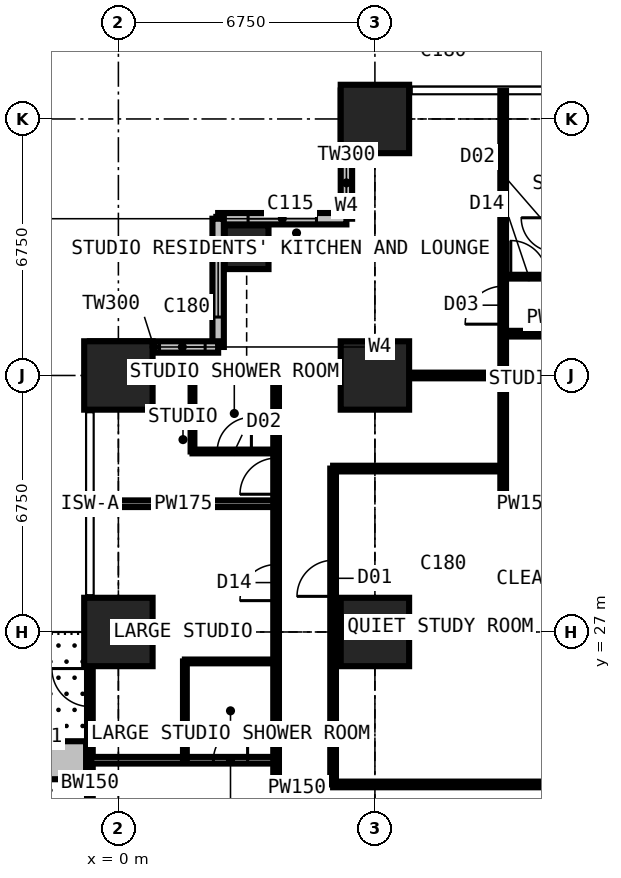
"""IFC4 building model, lengths in metres.
Left out: names, types, materials, properties, quantities, classifications, styles, units other than length and angle.
Written with IfcOpenShell. Run it as: python <this file> out.ifc"""

import sys

from ifc_helpers import new_model, si_unit, direction, frame, frame_2d, origin, origin_2d, place, context, subcontext, project, spatial, rectangle, extrude, element, fill, save


model = new_model("IFC4")
c1 = context("Model", 3, precision=1e-05, world=origin(), true_north=direction((0.0, 1.0)))
c2 = subcontext(c1, "Body", "Model", "MODEL_VIEW")
j1 = project(units=[si_unit("LENGTHUNIT", "METRE"), si_unit("PLANEANGLEUNIT", "RADIAN")], contexts=[c1])
p1 = place(None, origin())
s1 = spatial("IfcSite", under=j1, at=p1, CompositionType="ELEMENT")
p2 = place(p1, origin())
s2 = spatial("IfcBuilding", under=s1, at=p2, CompositionType="ELEMENT")
p3 = place(p2, frame((0.0, 0.0, 50.4)))
s3 = spatial("IfcBuildingStorey", under=s2, at=p3, CompositionType="ELEMENT", Elevation=50.4)
for number, where, z_axis, x_axis in (
    (1, (0.0, 27.0, 0.0), (0.0, 0.0, 1.0), (1.0, 0.0, 0.0)),
    (2, (0.0, 33.75, 0.0), (0.0, 0.0, 1.0), (1.0, 0.0, 0.0)),
):
    element("IfcColumn", number, at=place(p3, frame(where, z_axis=z_axis, x_axis=x_axis)), inside=s3, PredefinedType="COLUMN", context=c2, shape_type="SweptSolid", body=[
        extrude(rectangle(XDim=1.8, YDim=1.8, at=origin_2d()), origin(), (0.0, 0.0, 1.0), 3.6),
    ])
p4 = place(p3, frame((3.375, 37.125, 0.0), z_axis=(0.0, 0.0, 1.0), x_axis=(1.0, 0.0, 0.0)))
e3 = element("IfcColumn", 3, at=p4, inside=s3, PredefinedType="COLUMN", context=c2, shape_type="SweptSolid", body=[
    extrude(rectangle(XDim=1.15, YDim=1.15, at=origin_2d()), origin(), (0.0, 0.0, 1.0), 3.6),
])
for number, where, z_axis, x_axis in (
    (4, (6.75, 27.0, 0.0), (0.0, 0.0, 1.0), (1.0, 0.0, 0.0)),
    (5, (6.75, 33.75, 0.0), (0.0, 0.0, 1.0), (1.0, 0.0, 0.0)),
    (6, (6.75, 40.5, 0.0), (0.0, 0.0, 1.0), (1.0, 0.0, 0.0)),
):
    element("IfcColumn", number, at=place(p3, frame(where, z_axis=z_axis, x_axis=x_axis)), inside=s3, PredefinedType="COLUMN", context=c2, shape_type="SweptSolid", body=[
        extrude(rectangle(XDim=1.8, YDim=1.8, at=origin_2d()), origin(), (0.0, 0.0, 1.0), 3.6),
    ])
p5 = place(p3, frame((6.0, 41.25, 0.0), z_axis=(0.0, 0.0, 1.0), x_axis=(0.0, -1.0, 0.0)))
e7 = element("IfcWall", 7, at=p5, inside=s3, PredefinedType="SOLIDWALL", context=c2, shape_type="SweptSolid", body=[
    extrude(rectangle(XDim=3.375, YDim=0.3, at=frame_2d((1.688, 0.0))), origin(), (0.0, 0.0, 1.0), 3.375),
])
p6 = place(p5, frame((1.833, 0.0, 0.9)))
e8 = element("IfcOpeningElement", 8, at=p6, cuts=e7, PredefinedType="OPENING", context=c2, shape_type="SweptSolid", body=[
    extrude(rectangle(XDim=1.2, YDim=1.8, at=frame_2d((0.6, 0.9))), frame((0.0, 0.16, 0.0), z_axis=(0.0, -1.0, 0.0), x_axis=(1.0, 0.0, 0.0)), (0.0, 0.0, 1.0), 0.32),
])
p7 = place(p3, frame((6.0, 37.875, 0.0), z_axis=(0.0, 0.0, 1.0), x_axis=(-1.0, 0.0, 0.0)))
e9 = element("IfcWall", 9, at=p7, inside=s3, PredefinedType="SOLIDWALL", context=c2, shape_type="SweptSolid", body=[
    extrude(rectangle(XDim=3.375, YDim=0.3, at=frame_2d((1.688, 0.0))), origin(), (0.0, 0.0, 1.0), 3.375),
])
p8 = place(p7, frame((0.788, 0.0, 0.6)))
e10 = element("IfcOpeningElement", 10, at=p8, cuts=e9, PredefinedType="OPENING", context=c2, shape_type="SweptSolid", body=[
    extrude(rectangle(XDim=1.8, YDim=2.1, at=frame_2d((0.9, 1.05))), frame((0.0, 0.16, 0.0), z_axis=(0.0, -1.0, 0.0), x_axis=(1.0, 0.0, 0.0)), (0.0, 0.0, 1.0), 0.32),
])
p9 = place(p3, frame((2.625, 37.875, 0.0), z_axis=(0.0, 0.0, 1.0), x_axis=(0.0, -1.0, 0.0)))
e11 = element("IfcWall", 11, at=p9, inside=s3, PredefinedType="SOLIDWALL", context=c2, shape_type="SweptSolid", body=[
    extrude(rectangle(XDim=3.375, YDim=0.3, at=frame_2d((1.688, 0.0))), origin(), (0.0, 0.0, 1.0), 3.375),
])
p10 = place(p9, frame((0.788, 0.0, 0.6)))
e12 = element("IfcOpeningElement", 12, at=p10, cuts=e11, PredefinedType="OPENING", context=c2, shape_type="SweptSolid", body=[
    extrude(rectangle(XDim=1.8, YDim=2.1, at=frame_2d((0.9, 1.05))), frame((0.0, 0.16, 0.0), z_axis=(0.0, -1.0, 0.0), x_axis=(1.0, 0.0, 0.0)), (0.0, 0.0, 1.0), 0.32),
])
p11 = place(p3, frame((2.625, 34.5, 0.0), z_axis=(0.0, 0.0, 1.0), x_axis=(-1.0, 0.0, 0.0)))
e13 = element("IfcWall", 13, at=p11, inside=s3, PredefinedType="SOLIDWALL", context=c2, shape_type="SweptSolid", body=[
    extrude(rectangle(XDim=3.375, YDim=0.3, at=frame_2d((1.688, 0.0))), origin(), (0.0, 0.0, 1.0), 3.375),
])
p12 = place(p11, frame((0.343, 0.0, 0.9)))
e14 = element("IfcOpeningElement", 14, at=p12, cuts=e13, PredefinedType="OPENING", context=c2, shape_type="SweptSolid", body=[
    extrude(rectangle(XDim=1.2, YDim=1.8, at=frame_2d((0.6, 0.9))), frame((0.0, 0.16, 0.0), z_axis=(0.0, -1.0, 0.0), x_axis=(1.0, 0.0, 0.0)), (0.0, 0.0, 1.0), 0.32),
])
p13 = place(p3, frame((-0.75, 20.25, 0.0), z_axis=(0.0, 0.0, 1.0), x_axis=(0.0, 1.0, 0.0)))
e15 = element("IfcWall", 15, at=p13, inside=s3, PredefinedType="SOLIDWALL", context=c2, shape_type="SweptSolid", body=[
    extrude(rectangle(XDim=6.75, YDim=0.15, at=frame_2d((3.375, 0.0))), origin(), (0.0, 0.0, 1.0), 3.375),
])
p14 = place(p13, frame((0.962, 0.0, 0.0)))
e16 = element("IfcOpeningElement", 16, at=p14, cuts=e15, PredefinedType="OPENING", context=c2, shape_type="SweptSolid", body=[
    extrude(rectangle(XDim=1.0, YDim=2.2, at=frame_2d((0.5, 1.1))), frame((0.0, 0.085, 0.0), z_axis=(0.0, -1.0, 0.0), x_axis=(1.0, 0.0, 0.0)), (0.0, 0.0, 1.0), 0.17),
])
p15 = place(p13, frame((2.025, 0.0, 0.9)))
e17 = element("IfcOpeningElement", 17, at=p15, cuts=e15, PredefinedType="OPENING", context=c2, shape_type="SweptSolid", body=[
    extrude(rectangle(XDim=1.2, YDim=1.8, at=frame_2d((0.6, 0.9))), frame((0.0, 0.085, 0.0), z_axis=(0.0, -1.0, 0.0), x_axis=(1.0, 0.0, 0.0)), (0.0, 0.0, 1.0), 0.17),
])
p16 = place(p13, frame((4.788, 0.0, 0.0)))
e18 = element("IfcOpeningElement", 18, at=p16, cuts=e15, PredefinedType="OPENING", context=c2, shape_type="SweptSolid", body=[
    extrude(rectangle(XDim=1.0, YDim=2.2, at=frame_2d((0.5, 1.1))), frame((0.0, 0.085, 0.0), z_axis=(0.0, -1.0, 0.0), x_axis=(1.0, 0.0, 0.0)), (0.0, 0.0, 1.0), 0.17),
])
p17 = place(p13, frame((3.525, 0.0, 0.9)))
e19 = element("IfcOpeningElement", 19, at=p17, cuts=e15, PredefinedType="OPENING", context=c2, shape_type="SweptSolid", body=[
    extrude(rectangle(XDim=1.2, YDim=1.8, at=frame_2d((0.6, 0.9))), frame((0.0, 0.085, 0.0), z_axis=(0.0, -1.0, 0.0), x_axis=(1.0, 0.0, 0.0)), (0.0, 0.0, 1.0), 0.17),
])
p18 = place(p3, frame((-0.85, 23.625, 0.0), z_axis=(0.0, 0.0, 1.0), x_axis=(-1.0, 0.0, 0.0)))
e20 = element("IfcWall", 20, at=p18, inside=s3, PredefinedType="USERDEFINED", context=c2, shape_type="SweptSolid", body=[
    extrude(rectangle(XDim=2.2, YDim=1.0, at=frame_2d((1.1, 0.0))), origin(), (0.0, 0.0, 1.0), 0.9),
])
p19 = place(p3, frame((-0.734, 23.625, 0.0), z_axis=(0.0, 0.0, 1.0), x_axis=(1.0, 0.0, 0.0)))
e21 = element("IfcWall", 21, at=p19, inside=s3, PredefinedType="PARTITIONING", context=c2, shape_type="SweptSolid", body=[
    extrude(rectangle(XDim=4.884, YDim=0.175, at=frame_2d((2.442, 0.0))), origin(), (0.0, 0.0, 1.0), 3.375),
])
p20 = place(p19, frame((3.234, 0.0, 0.0)))
e22 = element("IfcOpeningElement", 22, at=p20, cuts=e21, PredefinedType="OPENING", context=c2, shape_type="SweptSolid", body=[
    extrude(rectangle(XDim=0.9, YDim=2.2, at=frame_2d((0.45, 1.1))), frame((0.0, 0.097, 0.0), z_axis=(0.0, -1.0, 0.0), x_axis=(1.0, 0.0, 0.0)), (0.0, 0.0, 1.0), 0.195),
])
p21 = place(p3, frame((-0.734, 30.375, 0.0), z_axis=(0.0, 0.0, 1.0), x_axis=(1.0, 0.0, 0.0)))
e23 = element("IfcWall", 23, at=p21, inside=s3, PredefinedType="PARTITIONING", context=c2, shape_type="SweptSolid", body=[
    extrude(rectangle(XDim=4.884, YDim=0.175, at=frame_2d((2.442, 0.0))), origin(), (0.0, 0.0, 1.0), 3.375),
])
p22 = place(p3, frame((-0.734, 33.75, 0.0), z_axis=(0.0, 0.0, 1.0), x_axis=(1.0, 0.0, 0.0)))
e24 = element("IfcWall", 24, at=p22, inside=s3, PredefinedType="PARTITIONING", context=c2, shape_type="SweptSolid", body=[
    extrude(rectangle(XDim=10.859, YDim=0.15, at=frame_2d((5.429, 0.0))), origin(), (0.0, 0.0, 1.0), 2.877),
])
p23 = place(p3, frame((1.75, 23.625, 0.0), z_axis=(0.0, 0.0, 1.0), x_axis=(0.0, 1.0, 0.0)))
e25 = element("IfcWall", 25, at=p23, inside=s3, PredefinedType="PARTITIONING", context=c2, shape_type="SweptSolid", body=[
    extrude(rectangle(XDim=2.6, YDim=0.1, at=frame_2d((1.3, 0.0))), origin(), (0.0, 0.0, 1.0), 3.375),
])
p24 = place(p3, frame((1.75, 26.225, 0.0), z_axis=(0.0, 0.0, 1.0), x_axis=(1.0, 0.0, 0.0)))
e26 = element("IfcWall", 26, at=p24, inside=s3, PredefinedType="PARTITIONING", context=c2, shape_type="SweptSolid", body=[
    extrude(rectangle(XDim=2.4, YDim=0.1, at=frame_2d((1.2, 0.0))), origin(), (0.0, 0.0, 1.0), 3.375),
])
p25 = place(p3, frame((1.95, 31.75, 0.0), z_axis=(0.0, 0.0, 1.0), x_axis=(0.0, 1.0, 0.0)))
e27 = element("IfcWall", 27, at=p25, inside=s3, PredefinedType="PARTITIONING", context=c2, shape_type="SweptSolid", body=[
    extrude(rectangle(XDim=2.0, YDim=0.1, at=frame_2d((1.0, 0.0))), origin(), (0.0, 0.0, 1.0), 3.375),
])
p26 = place(p3, frame((1.95, 31.75, 0.0), z_axis=(0.0, 0.0, 1.0), x_axis=(1.0, 0.0, 0.0)))
e28 = element("IfcWall", 28, at=p26, inside=s3, PredefinedType="PARTITIONING", context=c2, shape_type="SweptSolid", body=[
    extrude(rectangle(XDim=2.2, YDim=0.1, at=frame_2d((1.1, 0.0))), origin(), (0.0, 0.0, 1.0), 3.375),
])
p27 = place(p26, frame((0.65, 0.0, 0.0)))
e29 = element("IfcOpeningElement", 29, at=p27, cuts=e28, PredefinedType="OPENING", context=c2, shape_type="SweptSolid", body=[
    extrude(rectangle(XDim=0.9, YDim=2.2, at=frame_2d((0.45, 1.1))), frame((0.0, 0.06, 0.0), z_axis=(0.0, -1.0, 0.0), x_axis=(1.0, 0.0, 0.0)), (0.0, 0.0, 1.0), 0.12),
])
p28 = place(p3, frame((4.15, 10.125, 0.0), z_axis=(0.0, 0.0, 1.0), x_axis=(0.0, 1.0, 0.0)))
e30 = element("IfcWall", 30, at=p28, inside=s3, PredefinedType="PARTITIONING", context=c2, shape_type="SweptSolid", body=[
    extrude(rectangle(XDim=23.625, YDim=0.15, at=frame_2d((11.812, 0.0))), origin(), (0.0, 0.0, 1.0), 3.375),
])
p29 = place(p28, frame((4.2, 0.0, 0.0)))
e31 = element("IfcOpeningElement", 31, at=p29, cuts=e30, PredefinedType="OPENING", context=c2, shape_type="SweptSolid", body=[
    extrude(rectangle(XDim=0.95, YDim=2.2, at=frame_2d((0.475, 1.1))), frame((0.0, 0.085, 0.0), z_axis=(0.0, -1.0, 0.0), x_axis=(1.0, 0.0, 0.0)), (0.0, 0.0, 1.0), 0.17),
])
p30 = place(p28, frame((10.95, 0.0, 0.0)))
e32 = element("IfcOpeningElement", 32, at=p30, cuts=e30, PredefinedType="OPENING", context=c2, shape_type="SweptSolid", body=[
    extrude(rectangle(XDim=0.95, YDim=2.2, at=frame_2d((0.475, 1.1))), frame((0.0, 0.085, 0.0), z_axis=(0.0, -1.0, 0.0), x_axis=(1.0, 0.0, 0.0)), (0.0, 0.0, 1.0), 0.17),
])
p31 = place(p28, frame((17.7, 0.0, 0.0)))
e33 = element("IfcOpeningElement", 33, at=p31, cuts=e30, PredefinedType="OPENING", context=c2, shape_type="SweptSolid", body=[
    extrude(rectangle(XDim=0.95, YDim=2.2, at=frame_2d((0.475, 1.1))), frame((0.0, 0.085, 0.0), z_axis=(0.0, -1.0, 0.0), x_axis=(1.0, 0.0, 0.0)), (0.0, 0.0, 1.0), 0.17),
])
p32 = place(p28, frame((20.5, 0.0, 0.0)))
e34 = element("IfcOpeningElement", 34, at=p32, cuts=e30, PredefinedType="OPENING", context=c2, shape_type="SweptSolid", body=[
    extrude(rectangle(XDim=0.95, YDim=2.2, at=frame_2d((0.475, 1.1))), frame((0.0, 0.085, 0.0), z_axis=(0.0, -1.0, 0.0), x_axis=(1.0, 0.0, 0.0)), (0.0, 0.0, 1.0), 0.17),
])
p33 = place(p3, frame((5.65, 22.988, 0.0), z_axis=(0.0, 0.0, 1.0), x_axis=(0.0, 1.0, 0.0)))
e35 = element("IfcWall", 35, at=p33, inside=s3, PredefinedType="PARTITIONING", context=c2, shape_type="SweptSolid", body=[
    extrude(rectangle(XDim=8.312, YDim=0.15, at=frame_2d((4.156, 0.0))), origin(), (0.0, 0.0, 1.0), 3.375),
])
p34 = place(p33, frame((4.95, 0.0, 0.0)))
e36 = element("IfcOpeningElement", 36, at=p34, cuts=e35, PredefinedType="OPENING", context=c2, shape_type="SweptSolid", body=[
    extrude(rectangle(XDim=0.95, YDim=2.2, at=frame_2d((0.475, 1.1))), frame((0.0, 0.085, 0.0), z_axis=(0.0, -1.0, 0.0), x_axis=(1.0, 0.0, 0.0)), (0.0, 0.0, 1.0), 0.17),
])
p35 = place(p3, frame((5.65, 22.988, 0.0), z_axis=(0.0, 0.0, 1.0), x_axis=(1.0, 0.0, 0.0)))
e37 = element("IfcWall", 37, at=p35, inside=s3, PredefinedType="PARTITIONING", context=c2, shape_type="SweptSolid", body=[
    extrude(rectangle(XDim=5.65, YDim=0.15, at=frame_2d((2.825, 0.0))), origin(), (0.0, 0.0, 1.0), 3.375),
])
p36 = place(p3, frame((5.65, 31.3, 0.0), z_axis=(0.0, 0.0, 1.0), x_axis=(1.0, 0.0, 0.0)))
e38 = element("IfcWall", 38, at=p36, inside=s3, PredefinedType="PARTITIONING", context=c2, shape_type="SweptSolid", body=[
    extrude(rectangle(XDim=4.475, YDim=0.15, at=frame_2d((2.238, 0.0))), origin(), (0.0, 0.0, 1.0), 3.375),
])
p37 = place(p3, frame((10.125, 30.375, 0.0), z_axis=(0.0, 0.0, 1.0), x_axis=(0.0, 1.0, 0.0)))
e39 = element("IfcWall", 39, at=p37, inside=s3, PredefinedType="PARTITIONING", context=c2, shape_type="SweptSolid", body=[
    extrude(rectangle(XDim=10.859, YDim=0.15, at=frame_2d((5.429, 0.0))), origin(), (0.0, 0.0, 1.0), 3.375),
])
p38 = place(p37, frame((4.725, 0.0, 0.0)))
e40 = element("IfcOpeningElement", 40, at=p38, cuts=e39, PredefinedType="OPENING", context=c2, shape_type="SweptSolid", body=[
    extrude(rectangle(XDim=1.0, YDim=2.2, at=frame_2d((0.5, 1.1))), frame((0.0, 0.085, 0.0), z_axis=(0.0, -1.0, 0.0), x_axis=(1.0, 0.0, 0.0)), (0.0, 0.0, 1.0), 0.17),
])
p39 = place(p3, frame((10.125, 30.375, 0.0), z_axis=(0.0, 0.0, 1.0), x_axis=(1.0, 0.0, 0.0)))
e41 = element("IfcWall", 41, at=p39, inside=s3, PredefinedType="PARTITIONING", context=c2, shape_type="SweptSolid", body=[
    extrude(rectangle(XDim=1.175, YDim=0.15, at=frame_2d((0.587, 0.0))), origin(), (0.0, 0.0, 1.0), 3.375),
])
p40 = place(p3, frame((10.125, 34.85, 0.0), z_axis=(0.0, 0.0, 1.0), x_axis=(1.0, 0.0, 0.0)))
e42 = element("IfcWall", 42, at=p40, inside=s3, PredefinedType="PARTITIONING", context=c2, shape_type="SweptSolid", body=[
    extrude(rectangle(XDim=10.762, YDim=0.15, at=frame_2d((5.381, 0.0))), origin(), (0.0, 0.0, 1.0), 3.375),
])
p41 = place(p40, frame((4.9, 0.0, 0.0)))
e43 = element("IfcOpeningElement", 43, at=p41, cuts=e42, PredefinedType="OPENING", context=c2, shape_type="SweptSolid", body=[
    extrude(rectangle(XDim=0.95, YDim=2.2, at=frame_2d((0.475, 1.1))), frame((0.0, 0.085, 0.0), z_axis=(0.0, -1.0, 0.0), x_axis=(1.0, 0.0, 0.0)), (0.0, 0.0, 1.0), 0.17),
])
p42 = place(p3, frame((10.125, 36.35, 0.0), z_axis=(0.0, 0.0, 1.0), x_axis=(1.0, 0.0, 0.0)))
e44 = element("IfcWall", 44, at=p42, inside=s3, PredefinedType="PARTITIONING", context=c2, shape_type="SweptSolid", body=[
    extrude(rectangle(XDim=23.625, YDim=0.1, at=frame_2d((11.812, 0.0))), origin(), (0.0, 0.0, 1.0), 3.375),
])
p43 = place(p42, frame((21.45, 0.0, 0.0)))
e45 = element("IfcOpeningElement", 45, at=p43, cuts=e44, PredefinedType="OPENING", context=c2, shape_type="SweptSolid", body=[
    extrude(rectangle(XDim=1.0, YDim=2.2, at=frame_2d((0.5, 1.1))), frame((0.0, 0.06, 0.0), z_axis=(0.0, -1.0, 0.0), x_axis=(1.0, 0.0, 0.0)), (0.0, 0.0, 1.0), 0.12),
])
p44 = place(p42, frame((17.125, 0.0, 0.0)))
e46 = element("IfcOpeningElement", 46, at=p44, cuts=e44, PredefinedType="OPENING", context=c2, shape_type="SweptSolid", body=[
    extrude(rectangle(XDim=0.95, YDim=2.2, at=frame_2d((0.475, 1.1))), frame((0.0, 0.06, 0.0), z_axis=(0.0, -1.0, 0.0), x_axis=(1.0, 0.0, 0.0)), (0.0, 0.0, 1.0), 0.12),
])
p45 = place(p42, frame((13.7, 0.0, 0.0)))
e47 = element("IfcOpeningElement", 47, at=p45, cuts=e44, PredefinedType="OPENING", context=c2, shape_type="SweptSolid", body=[
    extrude(rectangle(XDim=0.95, YDim=2.2, at=frame_2d((0.475, 1.1))), frame((0.0, 0.06, 0.0), z_axis=(0.0, -1.0, 0.0), x_axis=(1.0, 0.0, 0.0)), (0.0, 0.0, 1.0), 0.12),
])
p46 = place(p42, frame((0.2, 0.0, 0.0)))
e48 = element("IfcOpeningElement", 48, at=p46, cuts=e44, PredefinedType="OPENING", context=c2, shape_type="SweptSolid", body=[
    extrude(rectangle(XDim=0.95, YDim=2.2, at=frame_2d((0.475, 1.1))), frame((0.0, 0.06, 0.0), z_axis=(0.0, -1.0, 0.0), x_axis=(1.0, 0.0, 0.0)), (0.0, 0.0, 1.0), 0.12),
])
p47 = place(p42, frame((3.625, 0.0, 0.0)))
e49 = element("IfcOpeningElement", 49, at=p47, cuts=e44, PredefinedType="OPENING", context=c2, shape_type="SweptSolid", body=[
    extrude(rectangle(XDim=0.95, YDim=2.2, at=frame_2d((0.475, 1.1))), frame((0.0, 0.06, 0.0), z_axis=(0.0, -1.0, 0.0), x_axis=(1.0, 0.0, 0.0)), (0.0, 0.0, 1.0), 0.12),
])
p48 = place(p42, frame((7.0, 0.0, 0.0)))
e50 = element("IfcOpeningElement", 50, at=p48, cuts=e44, PredefinedType="OPENING", context=c2, shape_type="SweptSolid", body=[
    extrude(rectangle(XDim=0.95, YDim=2.2, at=frame_2d((0.475, 1.1))), frame((0.0, 0.06, 0.0), z_axis=(0.0, -1.0, 0.0), x_axis=(1.0, 0.0, 0.0)), (0.0, 0.0, 1.0), 0.12),
])
p49 = place(p42, frame((10.375, 0.0, 0.0)))
e51 = element("IfcOpeningElement", 51, at=p49, cuts=e44, PredefinedType="OPENING", context=c2, shape_type="SweptSolid", body=[
    extrude(rectangle(XDim=0.95, YDim=2.2, at=frame_2d((0.475, 1.1))), frame((0.0, 0.06, 0.0), z_axis=(0.0, -1.0, 0.0), x_axis=(1.0, 0.0, 0.0)), (0.0, 0.0, 1.0), 0.12),
])
p50 = place(p6, origin())
e52 = element("IfcWindow", 52, at=p50, inside=s3, PartitioningType="SINGLE_PANEL", PredefinedType="WINDOW", context=c2, shape_type="SweptSolid", body=[
    extrude(rectangle(XDim=1.2, YDim=1.8, at=frame_2d((0.6, 0.9))), frame((0.0, 0.03, 0.0), z_axis=(0.0, -1.0, 0.0), x_axis=(1.0, 0.0, 0.0)), (0.0, 0.0, 1.0), 0.06),
])
fill(e8, e52)
p51 = place(p8, origin())
e53 = element("IfcWindow", 53, at=p51, inside=s3, PartitioningType="SINGLE_PANEL", PredefinedType="WINDOW", context=c2, shape_type="SweptSolid", body=[
    extrude(rectangle(XDim=1.8, YDim=2.1, at=frame_2d((0.9, 1.05))), frame((0.0, 0.03, 0.0), z_axis=(0.0, -1.0, 0.0), x_axis=(1.0, 0.0, 0.0)), (0.0, 0.0, 1.0), 0.06),
])
fill(e10, e53)
p52 = place(p10, origin())
e54 = element("IfcWindow", 54, at=p52, inside=s3, PartitioningType="SINGLE_PANEL", PredefinedType="WINDOW", context=c2, shape_type="SweptSolid", body=[
    extrude(rectangle(XDim=1.8, YDim=2.1, at=frame_2d((0.9, 1.05))), frame((0.0, 0.03, 0.0), z_axis=(0.0, -1.0, 0.0), x_axis=(1.0, 0.0, 0.0)), (0.0, 0.0, 1.0), 0.06),
])
fill(e12, e54)
p53 = place(p12, origin())
e55 = element("IfcWindow", 55, at=p53, inside=s3, PartitioningType="SINGLE_PANEL", PredefinedType="WINDOW", context=c2, shape_type="SweptSolid", body=[
    extrude(rectangle(XDim=1.2, YDim=1.8, at=frame_2d((0.6, 0.9))), frame((0.0, 0.03, 0.0), z_axis=(0.0, -1.0, 0.0), x_axis=(1.0, 0.0, 0.0)), (0.0, 0.0, 1.0), 0.06),
])
fill(e14, e55)
p54 = place(p15, origin())
e56 = element("IfcWindow", 56, at=p54, inside=s3, PartitioningType="SINGLE_PANEL", PredefinedType="WINDOW", context=c2, shape_type="SweptSolid", body=[
    extrude(rectangle(XDim=1.2, YDim=1.8, at=frame_2d((0.6, 0.9))), frame((0.0, 0.03, 0.0), z_axis=(0.0, -1.0, 0.0), x_axis=(1.0, 0.0, 0.0)), (0.0, 0.0, 1.0), 0.06),
])
fill(e17, e56)
p55 = place(p16, origin())
e57 = element("IfcDoor", 57, at=p55, inside=s3, OperationType="SINGLE_SWING_RIGHT", PredefinedType="DOOR", context=c2, shape_type="SweptSolid", body=[
    extrude(rectangle(XDim=1.0, YDim=2.2, at=frame_2d((0.5, 1.1))), frame((0.0, 0.025, 0.0), z_axis=(0.0, -1.0, 0.0), x_axis=(1.0, 0.0, 0.0)), (0.0, 0.0, 1.0), 0.05),
])
fill(e18, e57)
p56 = place(p17, origin())
e58 = element("IfcWindow", 58, at=p56, inside=s3, PartitioningType="SINGLE_PANEL", PredefinedType="WINDOW", context=c2, shape_type="SweptSolid", body=[
    extrude(rectangle(XDim=1.2, YDim=1.8, at=frame_2d((0.6, 0.9))), frame((0.0, 0.03, 0.0), z_axis=(0.0, -1.0, 0.0), x_axis=(1.0, 0.0, 0.0)), (0.0, 0.0, 1.0), 0.06),
])
fill(e19, e58)
p57 = place(p46, origin())
e59 = element("IfcDoor", 59, at=p57, inside=s3, OperationType="SINGLE_SWING_LEFT", PredefinedType="DOOR", context=c2, shape_type="SweptSolid", body=[
    extrude(rectangle(XDim=0.95, YDim=2.2, at=frame_2d((0.475, 1.1))), frame((0.0, 0.025, 0.0), z_axis=(0.0, -1.0, 0.0), x_axis=(1.0, 0.0, 0.0)), (0.0, 0.0, 1.0), 0.05),
])
fill(e48, e59)
p58 = place(p38, origin())
e60 = element("IfcDoor", 60, at=p58, inside=s3, OperationType="SINGLE_SWING_LEFT", PredefinedType="DOOR", context=c2, shape_type="SweptSolid", body=[
    extrude(rectangle(XDim=1.0, YDim=2.2, at=frame_2d((0.5, 1.1))), frame((0.0, 0.025, 0.0), z_axis=(0.0, -1.0, 0.0), x_axis=(1.0, 0.0, 0.0)), (0.0, 0.0, 1.0), 0.05),
])
fill(e40, e60)
p59 = place(p31, origin())
e61 = element("IfcDoor", 61, at=p59, inside=s3, OperationType="SINGLE_SWING_LEFT", PredefinedType="DOOR", context=c2, shape_type="SweptSolid", body=[
    extrude(rectangle(XDim=0.95, YDim=2.2, at=frame_2d((0.475, 1.1))), frame((0.0, 0.025, 0.0), z_axis=(0.0, -1.0, 0.0), x_axis=(1.0, 0.0, 0.0)), (0.0, 0.0, 1.0), 0.05),
])
fill(e33, e61)
p60 = place(p20, origin())
e62 = element("IfcDoor", 62, at=p60, inside=s3, OperationType="SINGLE_SWING_RIGHT", PredefinedType="DOOR", context=c2, shape_type="SweptSolid", body=[
    extrude(rectangle(XDim=0.9, YDim=2.2, at=frame_2d((0.45, 1.1))), frame((0.0, 0.025, 0.0), z_axis=(0.0, -1.0, 0.0), x_axis=(1.0, 0.0, 0.0)), (0.0, 0.0, 1.0), 0.05),
])
fill(e22, e62)
p61 = place(p32, origin())
e63 = element("IfcDoor", 63, at=p61, inside=s3, OperationType="SINGLE_SWING_LEFT", PredefinedType="DOOR", context=c2, shape_type="SweptSolid", body=[
    extrude(rectangle(XDim=0.95, YDim=2.2, at=frame_2d((0.475, 1.1))), frame((0.0, 0.025, 0.0), z_axis=(0.0, -1.0, 0.0), x_axis=(1.0, 0.0, 0.0)), (0.0, 0.0, 1.0), 0.05),
])
fill(e34, e63)
p62 = place(p27, origin())
e64 = element("IfcDoor", 64, at=p62, inside=s3, OperationType="SINGLE_SWING_RIGHT", PredefinedType="DOOR", context=c2, shape_type="SweptSolid", body=[
    extrude(rectangle(XDim=0.9, YDim=2.2, at=frame_2d((0.45, 1.1))), frame((0.0, 0.025, 0.0), z_axis=(0.0, -1.0, 0.0), x_axis=(1.0, 0.0, 0.0)), (0.0, 0.0, 1.0), 0.05),
])
fill(e29, e64)
p63 = place(p34, origin())
e65 = element("IfcDoor", 65, at=p63, inside=s3, OperationType="SINGLE_SWING_LEFT", PredefinedType="DOOR", context=c2, shape_type="SweptSolid", body=[
    extrude(rectangle(XDim=0.95, YDim=2.2, at=frame_2d((0.475, 1.1))), frame((0.0, 0.025, 0.0), z_axis=(0.0, -1.0, 0.0), x_axis=(1.0, 0.0, 0.0)), (0.0, 0.0, 1.0), 0.05),
])
fill(e36, e65)
save(model, sys.argv[1])
